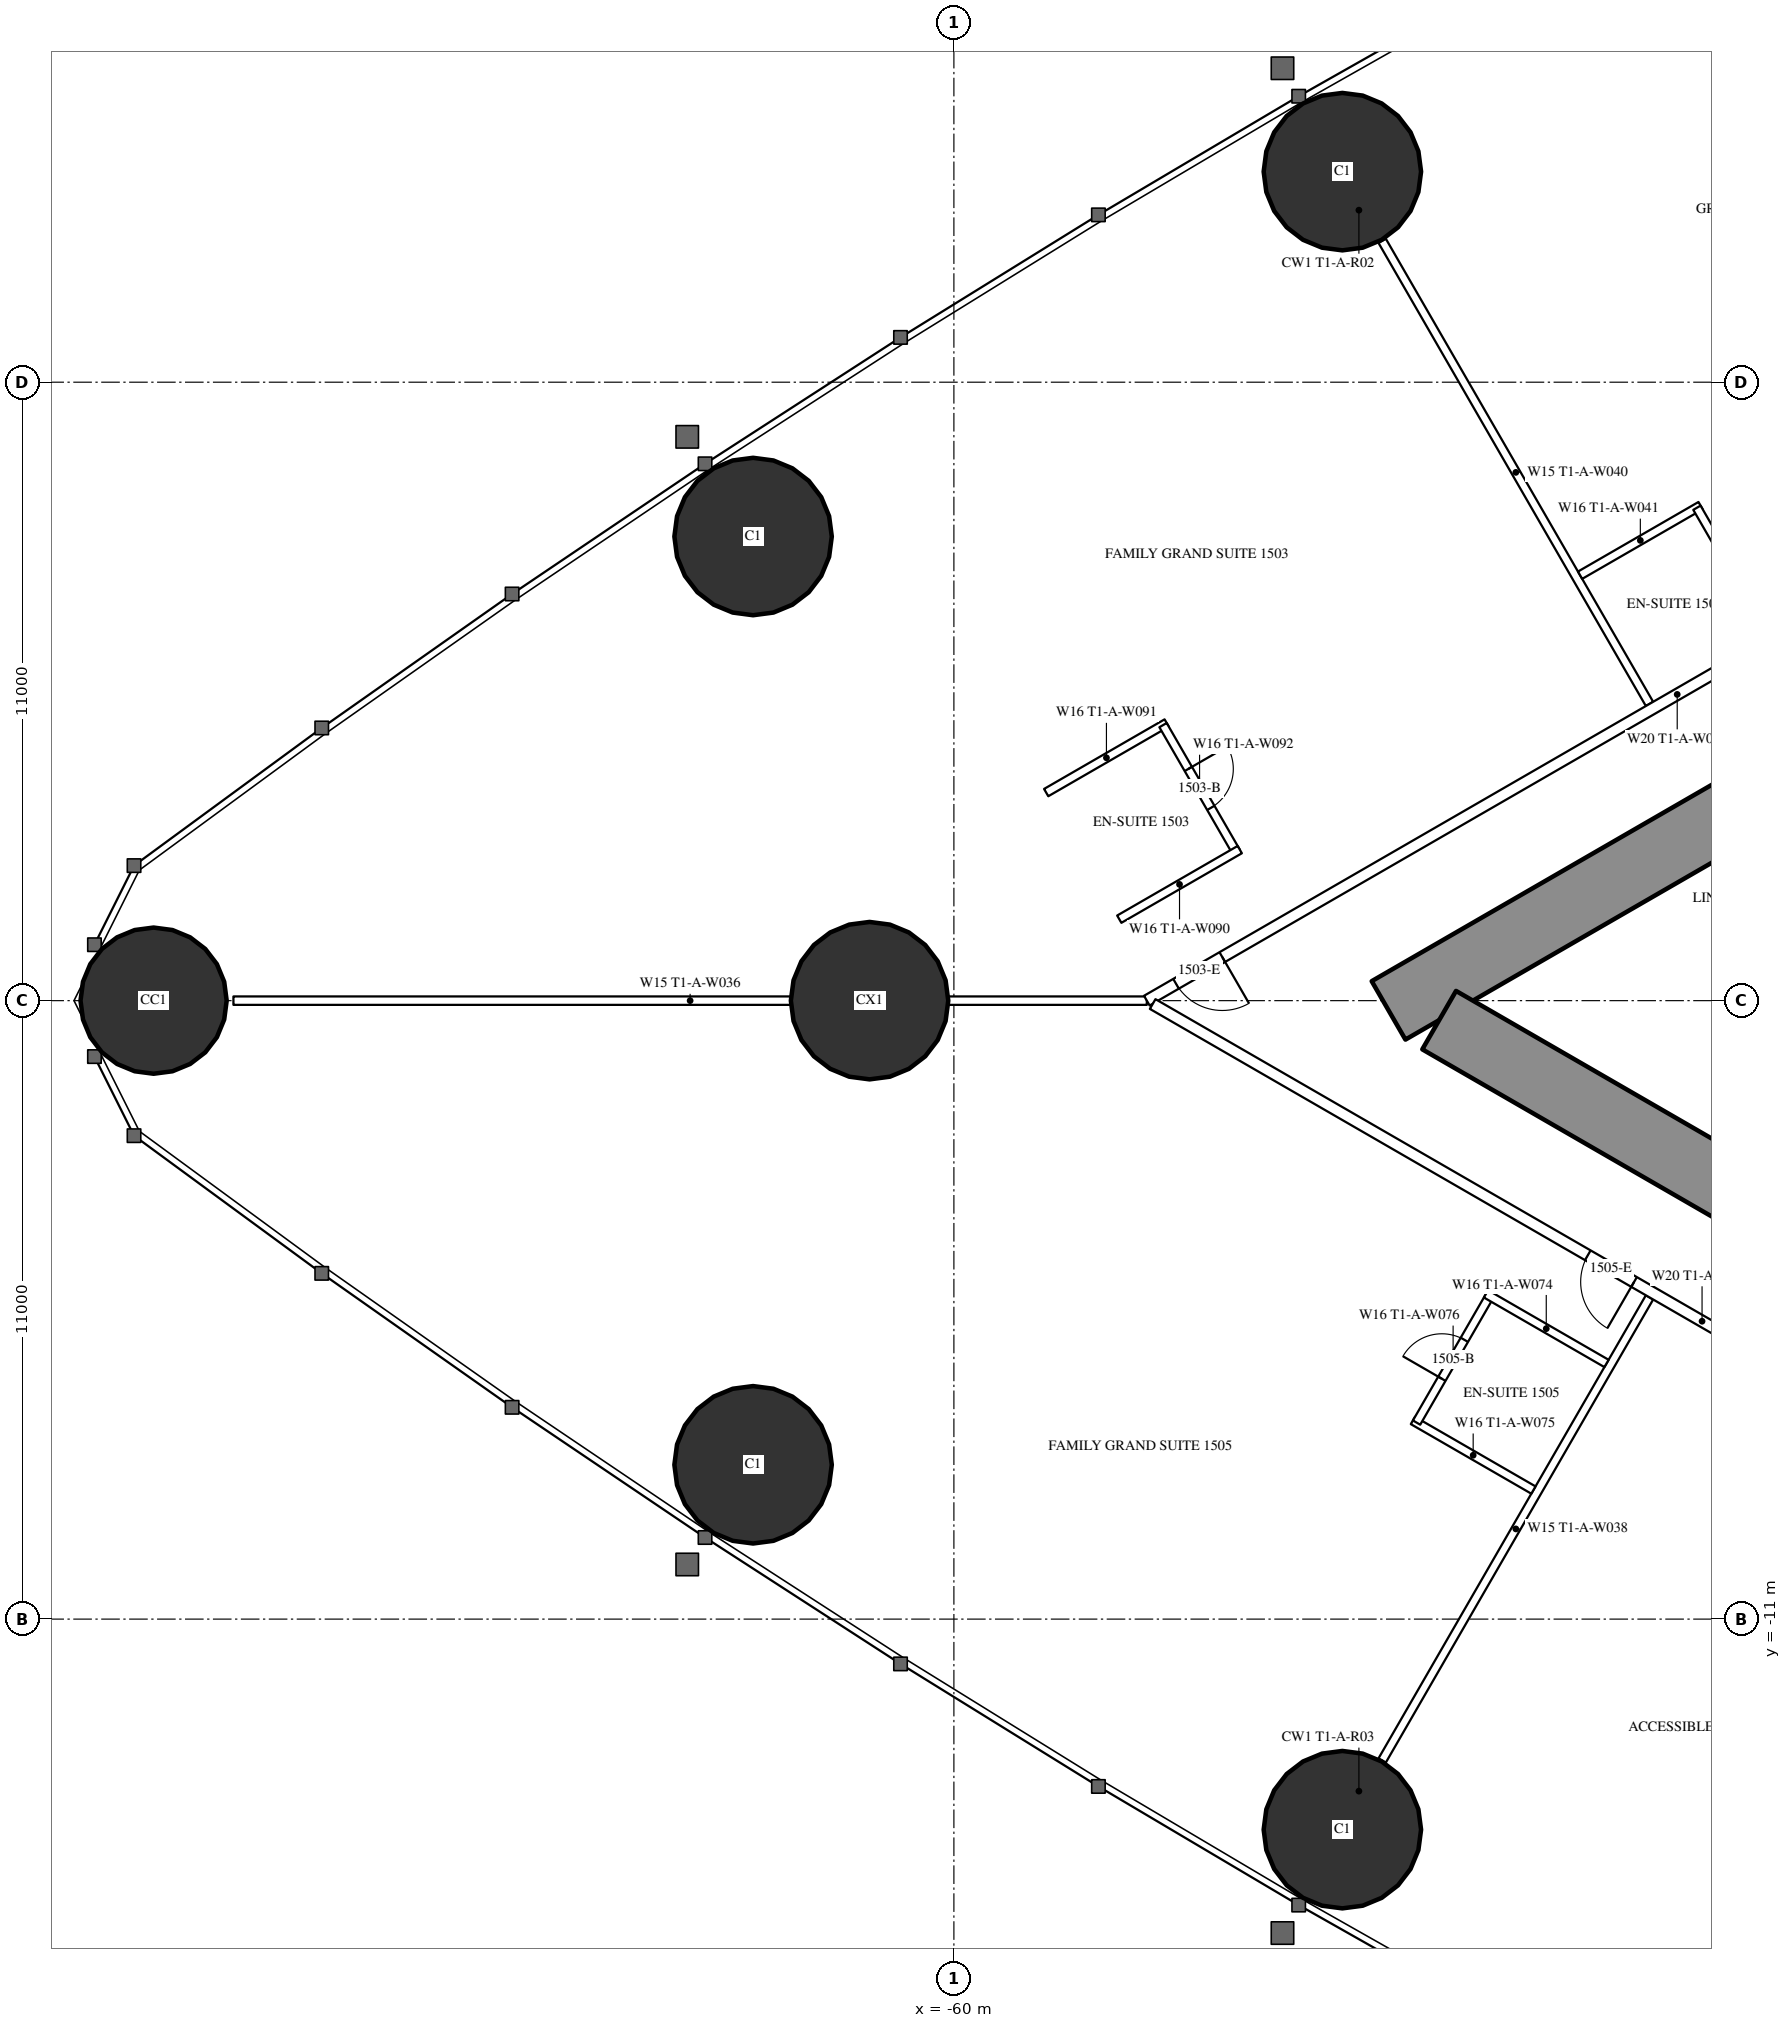
"""IFC4 building model, lengths in metres.
Left out: names, types, materials, properties, quantities, classifications, styles, units other than length and angle.
Written with IfcOpenShell. Run it as: python <this file> out.ifc"""

import sys

from ifc_helpers import new_model, si_unit, direction, frame, frame_2d, origin, origin_2d, place, context, subcontext, project, spatial, rectangle, hollow_circle, extrude, element, fill, save


model = new_model("IFC4")
c1 = context("Model", 3, precision=1e-05, world=origin(), true_north=direction((0.0, 1.0)))
c2 = subcontext(c1, "Body", "Model", "MODEL_VIEW")
j1 = project(units=[si_unit("LENGTHUNIT", "METRE"), si_unit("PLANEANGLEUNIT", "RADIAN")], contexts=[c1])
p1 = place(None, origin())
s1 = spatial("IfcSite", under=j1, at=p1, CompositionType="ELEMENT")
p2 = place(p1, origin())
s2 = spatial("IfcBuilding", under=s1, at=p2, CompositionType="ELEMENT")
p3 = place(p2, frame((0.0, 0.0, 60.0)))
s3 = spatial("IfcBuildingStorey", under=s2, at=p3, CompositionType="ELEMENT", Elevation=60.0)
p4 = place(p3, frame((-74.235, 0.0, 0.0), z_axis=(0.0, 0.0, 1.0), x_axis=(1.0, 0.0, 0.0)))
e1 = element("IfcColumn", 1, at=p4, inside=s3, PredefinedType="COLUMN", context=c2, shape_type="SweptSolid", body=[
    extrude(hollow_circle(Radius=1.3, WallThickness=0.1, at=origin_2d()), origin(), (0.0, 0.0, 1.0), 3.5),
])
for number, where, z_axis, x_axis in (
    (2, (-63.572, -8.255, 0.0), (0.0, 0.0, 1.0), (1.0, 0.0, 0.0)),
    (3, (-53.09, -14.745, 0.0), (0.0, 0.0, 1.0), (1.0, 0.0, 0.0)),
    (4, (-53.09, 14.745, 0.0), (0.0, 0.0, 1.0), (1.0, 0.0, 0.0)),
    (5, (-63.572, 8.255, 0.0), (0.0, 0.0, 1.0), (1.0, 0.0, 0.0)),
):
    element("IfcColumn", number, at=place(p3, frame(where, z_axis=z_axis, x_axis=x_axis)), inside=s3, PredefinedType="COLUMN", context=c2, shape_type="SweptSolid", body=[
        extrude(hollow_circle(Radius=1.4, WallThickness=0.12, at=origin_2d()), origin(), (0.0, 0.0, 1.0), 3.5),
    ])
p5 = place(p3, frame((-61.5, 0.0, 0.0), z_axis=(0.0, 0.0, 1.0), x_axis=(1.0, 0.0, 0.0)))
e6 = element("IfcColumn", 6, at=p5, inside=s3, PredefinedType="COLUMN", context=c2, shape_type="SweptSolid", body=[
    extrude(hollow_circle(Radius=1.4, WallThickness=0.1, at=origin_2d()), origin(), (0.0, 0.0, 1.0), 3.5),
])
p6 = place(p3, frame((-27.2, 14.3, 0.0), z_axis=(0.0, 0.0, 1.0), x_axis=(-0.866026593062, -0.499997940104, 0.0)))
e7 = element("IfcWall", 7, at=p6, inside=s3, PredefinedType="SHEAR", context=c2, shape_type="SweptSolid", body=[
    extrude(rectangle(XDim=28.946, YDim=1.2, at=frame_2d((14.473, 0.0))), origin(), (0.0, 0.0, 1.0), 3.5),
])
p7 = place(p6, frame((4.6, 0.0, 0.0)))
e8 = element("IfcOpeningElement", 8, at=p7, cuts=e7, PredefinedType="OPENING", context=c2, shape_type="SweptSolid", body=[
    extrude(rectangle(XDim=1.0, YDim=2.2, at=frame_2d((0.5, 1.1))), frame((0.0, 0.61, 0.0), z_axis=(0.0, -1.0, 0.0), x_axis=(1.0, 0.0, 0.0)), (0.0, 0.0, 1.0), 1.22),
])
p8 = place(p6, frame((13.395, 0.0, 0.0)))
e9 = element("IfcOpeningElement", 9, at=p8, cuts=e7, PredefinedType="OPENING", context=c2, shape_type="SweptSolid", body=[
    extrude(rectangle(XDim=1.8, YDim=2.2, at=frame_2d((0.9, 1.1))), frame((0.0, 0.61, 0.0), z_axis=(0.0, -1.0, 0.0), x_axis=(1.0, 0.0, 0.0)), (0.0, 0.0, 1.0), 1.22),
])
p9 = place(p3, frame((-27.2, -14.3, 0.0), z_axis=(0.0, 0.0, 1.0), x_axis=(-0.866024021859, 0.500002393557, 0.0)))
e10 = element("IfcWall", 10, at=p9, inside=s3, PredefinedType="SHEAR", context=c2, shape_type="SweptSolid", body=[
    extrude(rectangle(XDim=27.907, YDim=1.2, at=frame_2d((13.954, 0.0))), origin(), (0.0, 0.0, 1.0), 3.5),
])
p10 = place(p9, frame((4.6, 0.0, 0.0)))
e11 = element("IfcOpeningElement", 11, at=p10, cuts=e10, PredefinedType="OPENING", context=c2, shape_type="SweptSolid", body=[
    extrude(rectangle(XDim=1.0, YDim=2.2, at=frame_2d((0.5, 1.1))), frame((0.0, 0.61, 0.0), z_axis=(0.0, -1.0, 0.0), x_axis=(1.0, 0.0, 0.0)), (0.0, 0.0, 1.0), 1.22),
])
p11 = place(p9, frame((13.395, 0.0, 0.0)))
e12 = element("IfcOpeningElement", 12, at=p11, cuts=e10, PredefinedType="OPENING", context=c2, shape_type="SweptSolid", body=[
    extrude(rectangle(XDim=1.8, YDim=2.2, at=frame_2d((0.9, 1.1))), frame((0.0, 0.61, 0.0), z_axis=(0.0, -1.0, 0.0), x_axis=(1.0, 0.0, 0.0)), (0.0, 0.0, 1.0), 1.22),
])
for number, where, z_axis, x_axis in (
    (13, (-47.627, 5.278, 0.0), (0.0, 0.0, 1.0), (-0.5, 0.866, 0.0)),
    (14, (-47.627, -5.278, 0.0), (0.0, 0.0, 1.0), (-0.5, -0.866, 0.0)),
):
    element("IfcWall", number, at=place(p3, frame(where, z_axis=z_axis, x_axis=x_axis)), inside=s3, PredefinedType="PARTITIONING", context=c2, shape_type="SweptSolid", body=[
        extrude(rectangle(XDim=9.51, YDim=0.15, at=frame_2d((4.755, 0.0))), origin(), (0.0, 0.0, 1.0), 2.25),
    ])
p12 = place(p3, frame((-56.568, 0.0, 0.0), z_axis=(0.0, 0.0, 1.0), x_axis=(-1.0, 0.0, 0.0)))
e15 = element("IfcWall", 15, at=p12, inside=s3, PredefinedType="PARTITIONING", context=c2, shape_type="SweptSolid", body=[
    extrude(rectangle(XDim=16.247, YDim=0.15, at=frame_2d((8.124, 0.0))), origin(), (0.0, 0.0, 1.0), 2.25),
])
p13 = place(p3, frame((-37.7, 10.894, 0.0), z_axis=(0.0, 0.0, 1.0), x_axis=(-0.866027905338, -0.499995667157, 0.0)))
e16 = element("IfcWall", 16, at=p13, inside=s3, PredefinedType="PARTITIONING", context=c2, shape_type="SweptSolid", body=[
    extrude(rectangle(XDim=21.787, YDim=0.2, at=frame_2d((10.894, 0.0))), origin(), (0.0, 0.0, 1.0), 3.25),
])
p14 = place(p13, frame((20.237, 0.0, 0.0)))
e17 = element("IfcOpeningElement", 17, at=p14, cuts=e16, PredefinedType="OPENING", context=c2, shape_type="SweptSolid", body=[
    extrude(rectangle(XDim=0.95, YDim=2.2, at=frame_2d((0.475, 1.1))), frame((0.0, 0.11, 0.0), z_axis=(0.0, -1.0, 0.0), x_axis=(1.0, 0.0, 0.0)), (0.0, 0.0, 1.0), 0.22),
])
p15 = place(p13, frame((7.73, 0.0, 0.0)))
e18 = element("IfcOpeningElement", 18, at=p15, cuts=e16, PredefinedType="OPENING", context=c2, shape_type="SweptSolid", body=[
    extrude(rectangle(XDim=0.95, YDim=2.2, at=frame_2d((0.475, 1.1))), frame((0.0, 0.11, 0.0), z_axis=(0.0, -1.0, 0.0), x_axis=(1.0, 0.0, 0.0)), (0.0, 0.0, 1.0), 0.22),
])
p16 = place(p3, frame((-36.92, -11.344, 0.0), z_axis=(0.0, 0.0, 1.0), x_axis=(-0.866028313256, 0.499994960614, 0.0)))
e19 = element("IfcWall", 19, at=p16, inside=s3, PredefinedType="PARTITIONING", context=c2, shape_type="SweptSolid", body=[
    extrude(rectangle(XDim=22.568, YDim=0.2, at=frame_2d((11.284, 0.0))), origin(), (0.0, 0.0, 1.0), 3.25),
])
p17 = place(p16, frame((12.68, 0.0, 0.0)))
e20 = element("IfcOpeningElement", 20, at=p17, cuts=e19, PredefinedType="OPENING", context=c2, shape_type="SweptSolid", body=[
    extrude(rectangle(XDim=0.95, YDim=2.2, at=frame_2d((0.475, 1.1))), frame((0.0, 0.11, 0.0), z_axis=(0.0, -1.0, 0.0), x_axis=(1.0, 0.0, 0.0)), (0.0, 0.0, 1.0), 0.22),
])
p18 = place(p16, frame((3.35, 0.0, 0.0)))
e21 = element("IfcOpeningElement", 21, at=p18, cuts=e19, PredefinedType="OPENING", context=c2, shape_type="SweptSolid", body=[
    extrude(rectangle(XDim=1.0, YDim=2.2, at=frame_2d((0.5, 1.1))), frame((0.0, 0.11, 0.0), z_axis=(0.0, -1.0, 0.0), x_axis=(1.0, 0.0, 0.0)), (0.0, 0.0, 1.0), 0.22),
])
p19 = place(p3, frame((-56.215, 4.938, 0.0), z_axis=(0.0, 0.0, 1.0), x_axis=(-0.866006523861, -0.500032699561, 0.0)))
e22 = element("IfcWall", 22, at=p19, inside=s3, PredefinedType="PARTITIONING", context=c2, shape_type="SweptSolid", body=[
    extrude(rectangle(XDim=2.475, YDim=0.15, at=frame_2d((1.237, 0.0))), origin(), (0.0, 0.0, 1.0), 3.25),
])
p20 = place(p3, frame((-54.98, 2.649, 0.0), z_axis=(0.0, 0.0, 1.0), x_axis=(-0.500006934395, 0.866021400173, 0.0)))
e23 = element("IfcWall", 23, at=p20, inside=s3, PredefinedType="PARTITIONING", context=c2, shape_type="SweptSolid", body=[
    extrude(rectangle(XDim=2.6, YDim=0.15, at=frame_2d((1.3, 0.0))), origin(), (0.0, 0.0, 1.0), 3.25),
])
p21 = place(p20, frame((0.9, 0.0, 0.0)))
e24 = element("IfcOpeningElement", 24, at=p21, cuts=e23, PredefinedType="OPENING", context=c2, shape_type="SweptSolid", body=[
    extrude(rectangle(XDim=0.8, YDim=2.2, at=frame_2d((0.4, 1.1))), frame((0.0, 0.085, 0.0), z_axis=(0.0, -1.0, 0.0), x_axis=(1.0, 0.0, 0.0)), (0.0, 0.0, 1.0), 0.17),
])
p22 = place(p3, frame((-54.915, 2.687, 0.0), z_axis=(0.0, 0.0, 1.0), x_axis=(-0.866006523861, -0.500032699561, 0.0)))
e25 = element("IfcWall", 25, at=p22, inside=s3, PredefinedType="PARTITIONING", context=c2, shape_type="SweptSolid", body=[
    extrude(rectangle(XDim=2.475, YDim=0.15, at=frame_2d((1.237, 0.0))), origin(), (0.0, 0.0, 1.0), 3.25),
])
p23 = place(p3, frame((-49.692, -8.704, 0.0), z_axis=(0.0, 0.0, 1.0), x_axis=(-0.866073894602, 0.499916002032, 0.0)))
e26 = element("IfcWall", 26, at=p23, inside=s3, PredefinedType="PARTITIONING", context=c2, shape_type="SweptSolid", body=[
    extrude(rectangle(XDim=2.475, YDim=0.15, at=frame_2d((1.238, 0.0))), origin(), (0.0, 0.0, 1.0), 3.25),
])
p24 = place(p3, frame((-50.47, -5.253, 0.0), z_axis=(0.0, 0.0, 1.0), x_axis=(-0.500006934395, -0.866021400173, 0.0)))
e27 = element("IfcWall", 27, at=p24, inside=s3, PredefinedType="PARTITIONING", context=c2, shape_type="SweptSolid", body=[
    extrude(rectangle(XDim=2.6, YDim=0.15, at=frame_2d((1.3, 0.0))), origin(), (0.0, 0.0, 1.0), 3.25),
])
p25 = place(p24, frame((0.9, 0.0, 0.0)))
e28 = element("IfcOpeningElement", 28, at=p25, cuts=e27, PredefinedType="OPENING", context=c2, shape_type="SweptSolid", body=[
    extrude(rectangle(XDim=0.8, YDim=2.2, at=frame_2d((0.4, 1.1))), frame((0.0, 0.085, 0.0), z_axis=(0.0, -1.0, 0.0), x_axis=(1.0, 0.0, 0.0)), (0.0, 0.0, 1.0), 0.17),
])
for number, where, z_axis, x_axis in (
    (29, (-48.392, -6.453, 0.0), (0.0, 0.0, 1.0), (-0.866, 0.5, 0.0)),
    (30, (-46.719, 8.804, 0.0), (0.0, 0.0, 1.0), (-0.866, -0.5, 0.0)),
):
    element("IfcWall", number, at=place(p3, frame(where, z_axis=z_axis, x_axis=x_axis)), inside=s3, PredefinedType="PARTITIONING", context=c2, shape_type="SweptSolid", body=[
        extrude(rectangle(XDim=2.475, YDim=0.15, at=frame_2d((1.237, 0.0))), origin(), (0.0, 0.0, 1.0), 3.25),
    ])
p26 = place(p3, frame((-45.483, 6.515, 0.0), z_axis=(0.0, 0.0, 1.0), x_axis=(-0.500006934395, 0.866021400173, 0.0)))
e31 = element("IfcWall", 31, at=p26, inside=s3, PredefinedType="PARTITIONING", context=c2, shape_type="SweptSolid", body=[
    extrude(rectangle(XDim=2.6, YDim=0.15, at=frame_2d((1.3, 0.0))), origin(), (0.0, 0.0, 1.0), 3.25),
])
p27 = place(p26, frame((0.9, 0.0, 0.0)))
e32 = element("IfcOpeningElement", 32, at=p27, cuts=e31, PredefinedType="OPENING", context=c2, shape_type="SweptSolid", body=[
    extrude(rectangle(XDim=0.8, YDim=2.2, at=frame_2d((0.4, 1.1))), frame((0.0, 0.085, 0.0), z_axis=(0.0, -1.0, 0.0), x_axis=(1.0, 0.0, 0.0)), (0.0, 0.0, 1.0), 0.17),
])
p28 = place(p21, origin())
e33 = element("IfcDoor", 33, at=p28, inside=s3, OperationType="SINGLE_SWING_RIGHT", PredefinedType="DOOR", context=c2, shape_type="SweptSolid", body=[
    extrude(rectangle(XDim=0.8, YDim=2.2, at=frame_2d((0.4, 1.1))), frame((0.0, 0.025, 0.0), z_axis=(0.0, -1.0, 0.0), x_axis=(1.0, 0.0, 0.0)), (0.0, 0.0, 1.0), 0.05),
])
fill(e24, e33)
p29 = place(p14, origin())
e34 = element("IfcDoor", 34, at=p29, inside=s3, OperationType="SINGLE_SWING_LEFT", PredefinedType="DOOR", context=c2, shape_type="SweptSolid", body=[
    extrude(rectangle(XDim=0.95, YDim=2.2, at=frame_2d((0.475, 1.1))), frame((0.0, 0.025, 0.0), z_axis=(0.0, -1.0, 0.0), x_axis=(1.0, 0.0, 0.0)), (0.0, 0.0, 1.0), 0.05),
])
fill(e17, e34)
p30 = place(p25, origin())
e35 = element("IfcDoor", 35, at=p30, inside=s3, OperationType="SINGLE_SWING_RIGHT", PredefinedType="DOOR", context=c2, shape_type="SweptSolid", body=[
    extrude(rectangle(XDim=0.8, YDim=2.2, at=frame_2d((0.4, 1.1))), frame((0.0, 0.025, 0.0), z_axis=(0.0, -1.0, 0.0), x_axis=(1.0, 0.0, 0.0)), (0.0, 0.0, 1.0), 0.05),
])
fill(e28, e35)
p31 = place(p17, origin())
e36 = element("IfcDoor", 36, at=p31, inside=s3, OperationType="SINGLE_SWING_LEFT", PredefinedType="DOOR", context=c2, shape_type="SweptSolid", body=[
    extrude(rectangle(XDim=0.95, YDim=2.2, at=frame_2d((0.475, 1.1))), frame((0.0, 0.025, 0.0), z_axis=(0.0, -1.0, 0.0), x_axis=(1.0, 0.0, 0.0)), (0.0, 0.0, 1.0), 0.05),
])
fill(e20, e36)
save(model, sys.argv[1])
